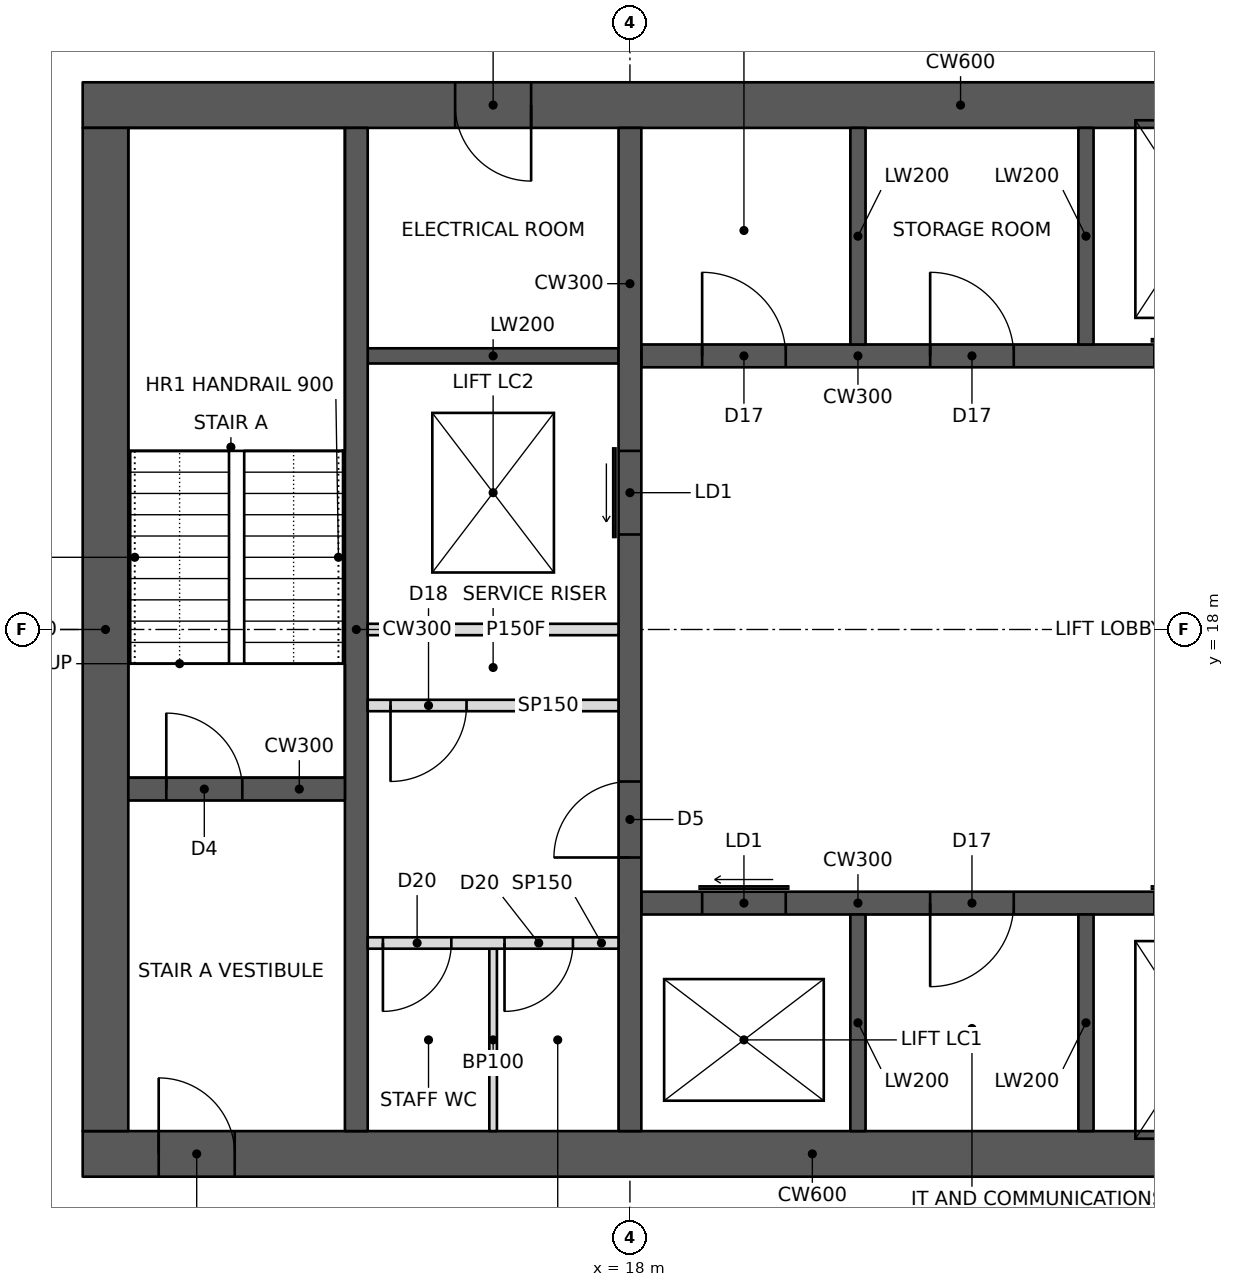
"""IFC4 building model, lengths in metres.
Left out: names, types, materials, properties, quantities, classifications, styles, units other than length and angle.
Written with IfcOpenShell. Run it as: python <this file> out.ifc"""

import sys

from ifc_helpers import new_model, si_unit, direction, frame, frame_2d, origin, place, context, subcontext, project, spatial, rectangle, extrude, element, fill, save


model = new_model("IFC4")
c1 = context("Model", 3, precision=1e-05, world=origin(), true_north=direction((0.0, 1.0)))
c2 = subcontext(c1, "Body", "Model", "MODEL_VIEW")
j1 = project(units=[si_unit("LENGTHUNIT", "METRE"), si_unit("PLANEANGLEUNIT", "RADIAN")], contexts=[c1])
p1 = place(None, origin())
s1 = spatial("IfcSite", under=j1, at=p1, CompositionType="ELEMENT")
p2 = place(p1, origin())
s2 = spatial("IfcBuilding", under=s1, at=p2, CompositionType="ELEMENT")
p3 = place(p2, frame((0.0, 0.0, 241.0)))
s3 = spatial("IfcBuildingStorey", under=s2, at=p3, CompositionType="ELEMENT", Elevation=241.0)
p4 = place(p3, frame((10.8, 11.1, 0.0), z_axis=(0.0, 0.0, 1.0), x_axis=(1.0, 0.0, 0.0)))
e1 = element("IfcWall", 1, at=p4, inside=s3, PredefinedType="SHEAR", context=c2, shape_type="SweptSolid", body=[
    extrude(rectangle(XDim=23.4, YDim=0.6, at=frame_2d((11.7, 0.0))), origin(), (0.0, 0.0, 1.0), 3.6),
])
p5 = place(p4, frame((1.0, 0.0, 0.0)))
e2 = element("IfcOpeningElement", 2, at=p5, cuts=e1, PredefinedType="OPENING", context=c2, shape_type="SweptSolid", body=[
    extrude(rectangle(XDim=1.0, YDim=2.1, at=frame_2d((0.5, 1.05))), frame((0.0, 0.31, 0.0), z_axis=(0.0, -1.0, 0.0), x_axis=(1.0, 0.0, 0.0)), (0.0, 0.0, 1.0), 0.62),
])
p6 = place(p4, frame((17.2, 0.0, 0.0)))
e3 = element("IfcOpeningElement", 3, at=p6, cuts=e1, PredefinedType="OPENING", context=c2, shape_type="SweptSolid", body=[
    extrude(rectangle(XDim=1.8, YDim=2.1, at=frame_2d((0.9, 1.05))), frame((0.0, 0.31, 0.0), z_axis=(0.0, -1.0, 0.0), x_axis=(1.0, 0.0, 0.0)), (0.0, 0.0, 1.0), 0.62),
])
p7 = place(p3, frame((10.8, 24.9, 0.0), z_axis=(0.0, 0.0, 1.0), x_axis=(1.0, 0.0, 0.0)))
e4 = element("IfcWall", 4, at=p7, inside=s3, PredefinedType="SHEAR", context=c2, shape_type="SweptSolid", body=[
    extrude(rectangle(XDim=23.4, YDim=0.6, at=frame_2d((11.7, 0.0))), origin(), (0.0, 0.0, 1.0), 3.6),
])
p8 = place(p7, frame((17.2, 0.0, 0.0)))
e5 = element("IfcOpeningElement", 5, at=p8, cuts=e4, PredefinedType="OPENING", context=c2, shape_type="SweptSolid", body=[
    extrude(rectangle(XDim=1.8, YDim=2.1, at=frame_2d((0.9, 1.05))), frame((0.0, 0.31, 0.0), z_axis=(0.0, -1.0, 0.0), x_axis=(1.0, 0.0, 0.0)), (0.0, 0.0, 1.0), 0.62),
])
p9 = place(p7, frame((21.1, 0.0, 0.0)))
e6 = element("IfcOpeningElement", 6, at=p9, cuts=e4, PredefinedType="OPENING", context=c2, shape_type="SweptSolid", body=[
    extrude(rectangle(XDim=1.0, YDim=2.1, at=frame_2d((0.5, 1.05))), frame((0.0, 0.31, 0.0), z_axis=(0.0, -1.0, 0.0), x_axis=(1.0, 0.0, 0.0)), (0.0, 0.0, 1.0), 0.62),
])
p10 = place(p7, frame((4.9, 0.0, 0.0)))
e7 = element("IfcOpeningElement", 7, at=p10, cuts=e4, PredefinedType="OPENING", context=c2, shape_type="SweptSolid", body=[
    extrude(rectangle(XDim=1.0, YDim=2.1, at=frame_2d((0.5, 1.05))), frame((0.0, 0.31, 0.0), z_axis=(0.0, -1.0, 0.0), x_axis=(1.0, 0.0, 0.0)), (0.0, 0.0, 1.0), 0.62),
])
p11 = place(p3, frame((11.1, 11.4, 0.0), z_axis=(0.0, 0.0, 1.0), x_axis=(0.0, 1.0, 0.0)))
e8 = element("IfcWall", 8, at=p11, inside=s3, PredefinedType="SHEAR", context=c2, shape_type="SweptSolid", body=[
    extrude(rectangle(XDim=13.2, YDim=0.6, at=frame_2d((6.6, 0.0))), origin(), (0.0, 0.0, 1.0), 3.6),
])
p12 = place(p3, frame((14.4, 11.4, 0.0), z_axis=(0.0, 0.0, 1.0), x_axis=(0.0, 1.0, 0.0)))
e9 = element("IfcWall", 9, at=p12, inside=s3, PredefinedType="SHEAR", context=c2, shape_type="SweptSolid", body=[
    extrude(rectangle(XDim=13.2, YDim=0.3, at=frame_2d((6.6, 0.0))), origin(), (0.0, 0.0, 1.0), 3.6),
])
p13 = place(p3, frame((11.4, 15.9, 0.0), z_axis=(0.0, 0.0, 1.0), x_axis=(1.0, 0.0, 0.0)))
e10 = element("IfcWall", 10, at=p13, inside=s3, PredefinedType="SHEAR", context=c2, shape_type="SweptSolid", body=[
    extrude(rectangle(XDim=2.85, YDim=0.3, at=frame_2d((1.425, 0.0))), origin(), (0.0, 0.0, 1.0), 3.6),
])
p14 = place(p13, frame((0.5, 0.0, 0.0)))
e11 = element("IfcOpeningElement", 11, at=p14, cuts=e10, PredefinedType="OPENING", context=c2, shape_type="SweptSolid", body=[
    extrude(rectangle(XDim=1.0, YDim=2.1, at=frame_2d((0.5, 1.05))), frame((0.0, 0.16, 0.0), z_axis=(0.0, -1.0, 0.0), x_axis=(1.0, 0.0, 0.0)), (0.0, 0.0, 1.0), 0.32),
])
p15 = place(p3, frame((18.0, 11.4, 0.0), z_axis=(0.0, 0.0, 1.0), x_axis=(0.0, 1.0, 0.0)))
e12 = element("IfcWall", 12, at=p15, inside=s3, PredefinedType="SHEAR", context=c2, shape_type="SweptSolid", body=[
    extrude(rectangle(XDim=13.2, YDim=0.3, at=frame_2d((6.6, 0.0))), origin(), (0.0, 0.0, 1.0), 3.6),
])
p16 = place(p15, frame((3.6, 0.0, 0.0)))
e13 = element("IfcOpeningElement", 13, at=p16, cuts=e12, PredefinedType="OPENING", context=c2, shape_type="SweptSolid", body=[
    extrude(rectangle(XDim=1.0, YDim=2.1, at=frame_2d((0.5, 1.05))), frame((0.0, 0.16, 0.0), z_axis=(0.0, -1.0, 0.0), x_axis=(1.0, 0.0, 0.0)), (0.0, 0.0, 1.0), 0.32),
])
p17 = place(p15, frame((7.85, 0.0, 0.0)))
e14 = element("IfcOpeningElement", 14, at=p17, cuts=e12, PredefinedType="OPENING", context=c2, shape_type="SweptSolid", body=[
    extrude(rectangle(XDim=1.1, YDim=2.1, at=frame_2d((0.55, 1.05))), frame((0.0, 0.16, 0.0), z_axis=(0.0, -1.0, 0.0), x_axis=(1.0, 0.0, 0.0)), (0.0, 0.0, 1.0), 0.32),
])
p18 = place(p3, frame((14.55, 18.0, 0.0), z_axis=(0.0, 0.0, 1.0), x_axis=(1.0, 0.0, 0.0)))
e15 = element("IfcWall", 15, at=p18, inside=s3, PredefinedType="PARTITIONING", context=c2, shape_type="SweptSolid", body=[
    extrude(rectangle(XDim=3.3, YDim=0.15, at=frame_2d((1.65, 0.0))), origin(), (0.0, 0.0, 1.0), 3.4),
])
p19 = place(p3, frame((18.15, 14.4, 0.0), z_axis=(0.0, 0.0, 1.0), x_axis=(1.0, 0.0, 0.0)))
e16 = element("IfcWall", 16, at=p19, inside=s3, PredefinedType="SHEAR", context=c2, shape_type="SweptSolid", body=[
    extrude(rectangle(XDim=9.0, YDim=0.3, at=frame_2d((4.5, 0.0))), origin(), (0.0, 0.0, 1.0), 3.6),
])
p20 = place(p19, frame((0.8, 0.0, 0.0)))
e17 = element("IfcOpeningElement", 17, at=p20, cuts=e16, PredefinedType="OPENING", context=c2, shape_type="SweptSolid", body=[
    extrude(rectangle(XDim=1.1, YDim=2.1, at=frame_2d((0.55, 1.05))), frame((0.0, 0.16, 0.0), z_axis=(0.0, -1.0, 0.0), x_axis=(1.0, 0.0, 0.0)), (0.0, 0.0, 1.0), 0.32),
])
p21 = place(p19, frame((6.75, 0.0, 0.0)))
e18 = element("IfcOpeningElement", 18, at=p21, cuts=e16, PredefinedType="OPENING", context=c2, shape_type="SweptSolid", body=[
    extrude(rectangle(XDim=1.2, YDim=2.1, at=frame_2d((0.6, 1.05))), frame((0.0, 0.16, 0.0), z_axis=(0.0, -1.0, 0.0), x_axis=(1.0, 0.0, 0.0)), (0.0, 0.0, 1.0), 0.32),
])
p22 = place(p19, frame((3.8, 0.0, 0.0)))
e19 = element("IfcOpeningElement", 19, at=p22, cuts=e16, PredefinedType="OPENING", context=c2, shape_type="SweptSolid", body=[
    extrude(rectangle(XDim=1.1, YDim=2.1, at=frame_2d((0.55, 1.05))), frame((0.0, 0.16, 0.0), z_axis=(0.0, -1.0, 0.0), x_axis=(1.0, 0.0, 0.0)), (0.0, 0.0, 1.0), 0.32),
])
for number, where, z_axis, x_axis in (
    (20, (21.0, 11.4, 0.0), (0.0, 0.0, 1.0), (0.0, 1.0, 0.0)),
    (21, (24.0, 11.4, 0.0), (0.0, 0.0, 1.0), (0.0, 1.0, 0.0)),
):
    element("IfcWall", number, at=place(p3, frame(where, z_axis=z_axis, x_axis=x_axis)), inside=s3, PredefinedType="SHEAR", context=c2, shape_type="SweptSolid", body=[
        extrude(rectangle(XDim=2.85, YDim=0.2, at=frame_2d((1.425, 0.0))), origin(), (0.0, 0.0, 1.0), 3.6),
    ])
p23 = place(p3, frame((18.15, 21.6, 0.0), z_axis=(0.0, 0.0, 1.0), x_axis=(1.0, 0.0, 0.0)))
e22 = element("IfcWall", 22, at=p23, inside=s3, PredefinedType="SHEAR", context=c2, shape_type="SweptSolid", body=[
    extrude(rectangle(XDim=9.0, YDim=0.3, at=frame_2d((4.5, 0.0))), origin(), (0.0, 0.0, 1.0), 3.6),
])
p24 = place(p23, frame((6.75, 0.0, 0.0)))
e23 = element("IfcOpeningElement", 23, at=p24, cuts=e22, PredefinedType="OPENING", context=c2, shape_type="SweptSolid", body=[
    extrude(rectangle(XDim=1.2, YDim=2.1, at=frame_2d((0.6, 1.05))), frame((0.0, 0.16, 0.0), z_axis=(0.0, -1.0, 0.0), x_axis=(1.0, 0.0, 0.0)), (0.0, 0.0, 1.0), 0.32),
])
p25 = place(p23, frame((0.8, 0.0, 0.0)))
e24 = element("IfcOpeningElement", 24, at=p25, cuts=e22, PredefinedType="OPENING", context=c2, shape_type="SweptSolid", body=[
    extrude(rectangle(XDim=1.1, YDim=2.1, at=frame_2d((0.55, 1.05))), frame((0.0, 0.16, 0.0), z_axis=(0.0, -1.0, 0.0), x_axis=(1.0, 0.0, 0.0)), (0.0, 0.0, 1.0), 0.32),
])
p26 = place(p23, frame((3.8, 0.0, 0.0)))
e25 = element("IfcOpeningElement", 25, at=p26, cuts=e22, PredefinedType="OPENING", context=c2, shape_type="SweptSolid", body=[
    extrude(rectangle(XDim=1.1, YDim=2.1, at=frame_2d((0.55, 1.05))), frame((0.0, 0.16, 0.0), z_axis=(0.0, -1.0, 0.0), x_axis=(1.0, 0.0, 0.0)), (0.0, 0.0, 1.0), 0.32),
])
for number, where, z_axis, x_axis in (
    (26, (21.0, 21.75, 0.0), (0.0, 0.0, 1.0), (0.0, 1.0, 0.0)),
    (27, (24.0, 21.75, 0.0), (0.0, 0.0, 1.0), (0.0, 1.0, 0.0)),
):
    element("IfcWall", number, at=place(p3, frame(where, z_axis=z_axis, x_axis=x_axis)), inside=s3, PredefinedType="SHEAR", context=c2, shape_type="SweptSolid", body=[
        extrude(rectangle(XDim=2.85, YDim=0.2, at=frame_2d((1.425, 0.0))), origin(), (0.0, 0.0, 1.0), 3.6),
    ])
p27 = place(p3, frame((14.55, 21.6, 0.0), z_axis=(0.0, 0.0, 1.0), x_axis=(1.0, 0.0, 0.0)))
e28 = element("IfcWall", 28, at=p27, inside=s3, PredefinedType="SHEAR", context=c2, shape_type="SweptSolid", body=[
    extrude(rectangle(XDim=3.3, YDim=0.2, at=frame_2d((1.65, 0.0))), origin(), (0.0, 0.0, 1.0), 3.6),
])
p28 = place(p3, frame((14.55, 17.0, 0.0), z_axis=(0.0, 0.0, 1.0), x_axis=(1.0, 0.0, 0.0)))
e29 = element("IfcWall", 29, at=p28, inside=s3, PredefinedType="PARTITIONING", context=c2, shape_type="SweptSolid", body=[
    extrude(rectangle(XDim=3.3, YDim=0.15, at=frame_2d((1.65, 0.0))), origin(), (0.0, 0.0, 1.0), 3.4),
])
p29 = place(p28, frame((0.3, 0.0, 0.0)))
e30 = element("IfcOpeningElement", 30, at=p29, cuts=e29, PredefinedType="OPENING", context=c2, shape_type="SweptSolid", body=[
    extrude(rectangle(XDim=1.0, YDim=2.1, at=frame_2d((0.5, 1.05))), frame((0.0, 0.085, 0.0), z_axis=(0.0, -1.0, 0.0), x_axis=(1.0, 0.0, 0.0)), (0.0, 0.0, 1.0), 0.17),
])
p30 = place(p3, frame((14.55, 13.875, 0.0), z_axis=(0.0, 0.0, 1.0), x_axis=(1.0, 0.0, 0.0)))
e31 = element("IfcWall", 31, at=p30, inside=s3, PredefinedType="PARTITIONING", context=c2, shape_type="SweptSolid", body=[
    extrude(rectangle(XDim=3.3, YDim=0.15, at=frame_2d((1.65, 0.0))), origin(), (0.0, 0.0, 1.0), 3.4),
])
p31 = place(p30, frame((0.2, 0.0, 0.0)))
e32 = element("IfcOpeningElement", 32, at=p31, cuts=e31, PredefinedType="OPENING", context=c2, shape_type="SweptSolid", body=[
    extrude(rectangle(XDim=0.9, YDim=2.1, at=frame_2d((0.45, 1.05))), frame((0.0, 0.085, 0.0), z_axis=(0.0, -1.0, 0.0), x_axis=(1.0, 0.0, 0.0)), (0.0, 0.0, 1.0), 0.17),
])
p32 = place(p30, frame((1.8, 0.0, 0.0)))
e33 = element("IfcOpeningElement", 33, at=p32, cuts=e31, PredefinedType="OPENING", context=c2, shape_type="SweptSolid", body=[
    extrude(rectangle(XDim=0.9, YDim=2.1, at=frame_2d((0.45, 1.05))), frame((0.0, 0.085, 0.0), z_axis=(0.0, -1.0, 0.0), x_axis=(1.0, 0.0, 0.0)), (0.0, 0.0, 1.0), 0.17),
])
p33 = place(p3, frame((16.2, 11.4, 0.0), z_axis=(0.0, 0.0, 1.0), x_axis=(0.0, 1.0, 0.0)))
e34 = element("IfcWall", 34, at=p33, inside=s3, PredefinedType="PARTITIONING", context=c2, shape_type="SweptSolid", body=[
    extrude(rectangle(XDim=2.4, YDim=0.1, at=frame_2d((1.2, 0.0))), origin(), (0.0, 0.0, 1.0), 3.4),
])
p34 = place(p29, frame((1.0, 0.0, 0.0), z_axis=(0.0, 0.0, 1.0), x_axis=(-1.0, 0.0, 0.0)))
e35 = element("IfcDoor", 35, at=p34, inside=s3, OperationType="SINGLE_SWING_RIGHT", PredefinedType="DOOR", context=c2, shape_type="SweptSolid", body=[
    extrude(rectangle(XDim=1.0, YDim=2.1, at=frame_2d((0.5, 1.05))), frame((0.0, 0.025, 0.0), z_axis=(0.0, -1.0, 0.0), x_axis=(1.0, 0.0, 0.0)), (0.0, 0.0, 1.0), 0.05),
])
fill(e30, e35)
p35 = place(p31, frame((0.9, 0.0, 0.0), z_axis=(0.0, 0.0, 1.0), x_axis=(-1.0, 0.0, 0.0)))
e36 = element("IfcDoor", 36, at=p35, inside=s3, OperationType="SINGLE_SWING_RIGHT", PredefinedType="DOOR", context=c2, shape_type="SweptSolid", body=[
    extrude(rectangle(XDim=0.9, YDim=2.1, at=frame_2d((0.45, 1.05))), frame((0.0, 0.025, 0.0), z_axis=(0.0, -1.0, 0.0), x_axis=(1.0, 0.0, 0.0)), (0.0, 0.0, 1.0), 0.05),
])
fill(e32, e36)
p36 = place(p32, frame((0.9, 0.0, 0.0), z_axis=(0.0, 0.0, 1.0), x_axis=(-1.0, 0.0, 0.0)))
e37 = element("IfcDoor", 37, at=p36, inside=s3, OperationType="SINGLE_SWING_RIGHT", PredefinedType="DOOR", context=c2, shape_type="SweptSolid", body=[
    extrude(rectangle(XDim=0.9, YDim=2.1, at=frame_2d((0.45, 1.05))), frame((0.0, 0.025, 0.0), z_axis=(0.0, -1.0, 0.0), x_axis=(1.0, 0.0, 0.0)), (0.0, 0.0, 1.0), 0.05),
])
fill(e33, e37)
p37 = place(p5, origin())
e38 = element("IfcDoor", 38, at=p37, inside=s3, OperationType="SINGLE_SWING_LEFT", PredefinedType="DOOR", context=c2, shape_type="SweptSolid", body=[
    extrude(rectangle(XDim=1.0, YDim=2.1, at=frame_2d((0.5, 1.05))), frame((0.0, 0.025, 0.0), z_axis=(0.0, -1.0, 0.0), x_axis=(1.0, 0.0, 0.0)), (0.0, 0.0, 1.0), 0.05),
])
fill(e2, e38)
p38 = place(p14, origin())
e39 = element("IfcDoor", 39, at=p38, inside=s3, OperationType="SINGLE_SWING_LEFT", PredefinedType="DOOR", context=c2, shape_type="SweptSolid", body=[
    extrude(rectangle(XDim=1.0, YDim=2.1, at=frame_2d((0.5, 1.05))), frame((0.0, 0.025, 0.0), z_axis=(0.0, -1.0, 0.0), x_axis=(1.0, 0.0, 0.0)), (0.0, 0.0, 1.0), 0.05),
])
fill(e11, e39)
p39 = place(p16, origin())
e40 = element("IfcDoor", 40, at=p39, inside=s3, OperationType="SINGLE_SWING_LEFT", PredefinedType="DOOR", context=c2, shape_type="SweptSolid", body=[
    extrude(rectangle(XDim=1.0, YDim=2.1, at=frame_2d((0.5, 1.05))), frame((0.0, 0.025, 0.0), z_axis=(0.0, -1.0, 0.0), x_axis=(1.0, 0.0, 0.0)), (0.0, 0.0, 1.0), 0.05),
])
fill(e13, e40)
p40 = place(p10, frame((1.0, 0.0, 0.0), z_axis=(0.0, 0.0, 1.0), x_axis=(-1.0, 0.0, 0.0)))
e41 = element("IfcDoor", 41, at=p40, inside=s3, OperationType="SINGLE_SWING_LEFT", PredefinedType="DOOR", context=c2, shape_type="SweptSolid", body=[
    extrude(rectangle(XDim=1.0, YDim=2.1, at=frame_2d((0.5, 1.05))), frame((0.0, 0.025, 0.0), z_axis=(0.0, -1.0, 0.0), x_axis=(1.0, 0.0, 0.0)), (0.0, 0.0, 1.0), 0.05),
])
fill(e7, e41)
p41 = place(p20, origin())
e42 = element("IfcDoor", 42, at=p41, inside=s3, OperationType="SLIDING_TO_LEFT", PredefinedType="DOOR", context=c2, shape_type="SweptSolid", body=[
    extrude(rectangle(XDim=1.1, YDim=2.1, at=frame_2d((0.55, 1.05))), frame((0.0, 0.025, 0.0), z_axis=(0.0, -1.0, 0.0), x_axis=(1.0, 0.0, 0.0)), (0.0, 0.0, 1.0), 0.05),
])
fill(e17, e42)
p42 = place(p17, origin())
e43 = element("IfcDoor", 43, at=p42, inside=s3, OperationType="SLIDING_TO_LEFT", PredefinedType="DOOR", context=c2, shape_type="SweptSolid", body=[
    extrude(rectangle(XDim=1.1, YDim=2.1, at=frame_2d((0.55, 1.05))), frame((0.0, 0.025, 0.0), z_axis=(0.0, -1.0, 0.0), x_axis=(1.0, 0.0, 0.0)), (0.0, 0.0, 1.0), 0.05),
])
fill(e14, e43)
p43 = place(p25, origin())
e44 = element("IfcDoor", 44, at=p43, inside=s3, OperationType="SINGLE_SWING_LEFT", PredefinedType="DOOR", context=c2, shape_type="SweptSolid", body=[
    extrude(rectangle(XDim=1.1, YDim=2.1, at=frame_2d((0.55, 1.05))), frame((0.0, 0.025, 0.0), z_axis=(0.0, -1.0, 0.0), x_axis=(1.0, 0.0, 0.0)), (0.0, 0.0, 1.0), 0.05),
])
fill(e24, e44)
p44 = place(p26, origin())
e45 = element("IfcDoor", 45, at=p44, inside=s3, OperationType="SINGLE_SWING_LEFT", PredefinedType="DOOR", context=c2, shape_type="SweptSolid", body=[
    extrude(rectangle(XDim=1.1, YDim=2.1, at=frame_2d((0.55, 1.05))), frame((0.0, 0.025, 0.0), z_axis=(0.0, -1.0, 0.0), x_axis=(1.0, 0.0, 0.0)), (0.0, 0.0, 1.0), 0.05),
])
fill(e25, e45)
p45 = place(p22, frame((1.1, 0.0, 0.0), z_axis=(0.0, 0.0, 1.0), x_axis=(-1.0, 0.0, 0.0)))
e46 = element("IfcDoor", 46, at=p45, inside=s3, OperationType="SINGLE_SWING_RIGHT", PredefinedType="DOOR", context=c2, shape_type="SweptSolid", body=[
    extrude(rectangle(XDim=1.1, YDim=2.1, at=frame_2d((0.55, 1.05))), frame((0.0, 0.025, 0.0), z_axis=(0.0, -1.0, 0.0), x_axis=(1.0, 0.0, 0.0)), (0.0, 0.0, 1.0), 0.05),
])
fill(e19, e46)
save(model, sys.argv[1])
